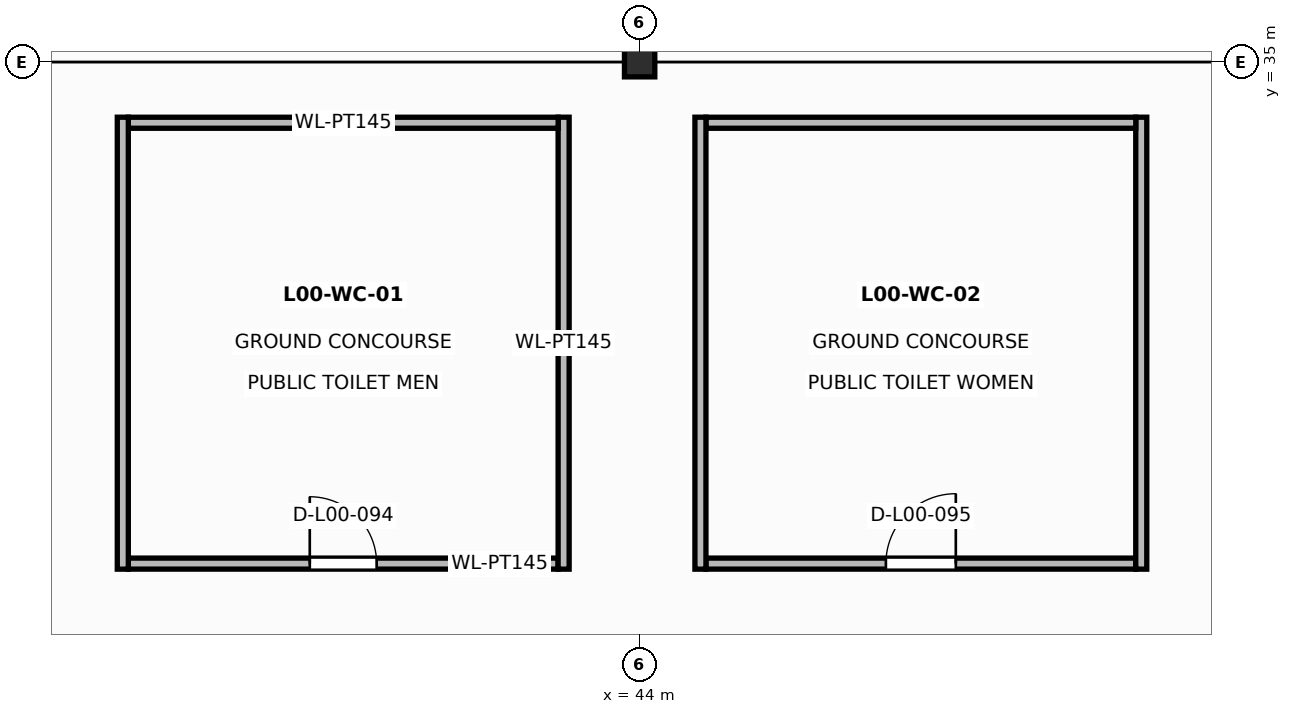
"""IFC4 building model, lengths in metres.
Left out: names, types, materials, properties, quantities, classifications, styles, units other than length and angle.
Written with IfcOpenShell. Run it as: python <this file> out.ifc"""

import sys

from ifc_helpers import new_model, si_unit, direction, frame, frame_2d, origin, origin_2d, place, context, subcontext, project, spatial, rectangle, i_section, extrude, element, fill, save


model = new_model("IFC4")
c1 = context("Model", 3, precision=1e-05, world=origin(), true_north=direction((0.0, 1.0)))
c2 = subcontext(c1, "Body", "Model", "MODEL_VIEW")
j1 = project(units=[si_unit("LENGTHUNIT", "METRE"), si_unit("PLANEANGLEUNIT", "RADIAN")], contexts=[c1])
p1 = place(None, origin())
s1 = spatial("IfcSite", under=j1, at=p1, CompositionType="ELEMENT")
p2 = place(p1, origin())
s2 = spatial("IfcBuilding", under=s1, at=p2, CompositionType="ELEMENT")
p3 = place(p2, origin())
s3 = spatial("IfcBuildingStorey", under=s2, at=p3, CompositionType="ELEMENT", Elevation=0.0)
p4 = place(p3, frame((44.0, 35.0, 0.0), z_axis=(0.0, 0.0, 1.0), x_axis=(1.0, 0.0, 0.0)))
e1 = element("IfcColumn", 1, at=p4, inside=s3, PredefinedType="COLUMN", context=c2, shape_type="SweptSolid", body=[
    extrude(i_section(OverallWidth=0.399, OverallDepth=0.393, WebThickness=0.023, FlangeThickness=0.037, at=origin_2d()), origin(), (0.0, 0.0, 1.0), 6.0),
])
p5 = place(p3, frame((37.273, 28.4, 0.0), z_axis=(0.0, 0.0, 1.0), x_axis=(1.0, 0.0, 0.0)))
e2 = element("IfcWall", 2, at=p5, inside=s3, PredefinedType="PARTITIONING", context=c2, shape_type="SweptSolid", body=[
    extrude(rectangle(XDim=5.655, YDim=0.145, at=frame_2d((2.828, 0.0))), origin(), (0.0, 0.0, 1.0), 5.73),
])
p6 = place(p5, frame((2.387, 0.0, 0.0)))
e3 = element("IfcOpeningElement", 3, at=p6, cuts=e2, PredefinedType="OPENING", context=c2, shape_type="SweptSolid", body=[
    extrude(rectangle(XDim=0.88, YDim=2.08, at=frame_2d((0.44, 1.04))), frame((0.0, 0.083, 0.0), z_axis=(0.0, -1.0, 0.0), x_axis=(1.0, 0.0, 0.0)), (0.0, 0.0, 1.0), 0.165),
])
p7 = place(p3, frame((43.0, 28.327, 0.0), z_axis=(0.0, 0.0, 1.0), x_axis=(0.0, 1.0, 0.0)))
e4 = element("IfcWall", 4, at=p7, inside=s3, PredefinedType="PARTITIONING", context=c2, shape_type="SweptSolid", body=[
    extrude(rectangle(XDim=5.946, YDim=0.145, at=frame_2d((2.973, 0.0))), origin(), (0.0, 0.0, 1.0), 5.73),
])
p8 = place(p3, frame((42.928, 34.2, 0.0), z_axis=(0.0, 0.0, 1.0), x_axis=(-1.0, 0.0, 0.0)))
e5 = element("IfcWall", 5, at=p8, inside=s3, PredefinedType="PARTITIONING", context=c2, shape_type="SweptSolid", body=[
    extrude(rectangle(XDim=5.655, YDim=0.145, at=frame_2d((2.828, 0.0))), origin(), (0.0, 0.0, 1.0), 5.73),
])
p9 = place(p3, frame((37.2, 34.273, 0.0), z_axis=(0.0, 0.0, 1.0), x_axis=(0.0, -1.0, 0.0)))
e6 = element("IfcWall", 6, at=p9, inside=s3, PredefinedType="PARTITIONING", context=c2, shape_type="SweptSolid", body=[
    extrude(rectangle(XDim=5.946, YDim=0.145, at=frame_2d((2.973, 0.0))), origin(), (0.0, 0.0, 1.0), 5.73),
])
p10 = place(p3, frame((44.872, 28.4, 0.0), z_axis=(0.0, 0.0, 1.0), x_axis=(1.0, 0.0, 0.0)))
e7 = element("IfcWall", 7, at=p10, inside=s3, PredefinedType="PARTITIONING", context=c2, shape_type="SweptSolid", body=[
    extrude(rectangle(XDim=5.656, YDim=0.145, at=frame_2d((2.828, 0.0))), origin(), (0.0, 0.0, 1.0), 5.73),
])
p11 = place(p10, frame((2.368, 0.0, 0.0)))
e8 = element("IfcOpeningElement", 8, at=p11, cuts=e7, PredefinedType="OPENING", context=c2, shape_type="SweptSolid", body=[
    extrude(rectangle(XDim=0.92, YDim=2.1, at=frame_2d((0.46, 1.05))), frame((0.0, 0.083, 0.0), z_axis=(0.0, -1.0, 0.0), x_axis=(1.0, 0.0, 0.0)), (0.0, 0.0, 1.0), 0.165),
])
p12 = place(p3, frame((50.6, 28.327, 0.0), z_axis=(0.0, 0.0, 1.0), x_axis=(0.0, 1.0, 0.0)))
e9 = element("IfcWall", 9, at=p12, inside=s3, PredefinedType="PARTITIONING", context=c2, shape_type="SweptSolid", body=[
    extrude(rectangle(XDim=5.946, YDim=0.145, at=frame_2d((2.973, 0.0))), origin(), (0.0, 0.0, 1.0), 5.73),
])
p13 = place(p3, frame((50.528, 34.2, 0.0), z_axis=(0.0, 0.0, 1.0), x_axis=(-1.0, 0.0, 0.0)))
e10 = element("IfcWall", 10, at=p13, inside=s3, PredefinedType="PARTITIONING", context=c2, shape_type="SweptSolid", body=[
    extrude(rectangle(XDim=5.656, YDim=0.145, at=frame_2d((2.828, 0.0))), origin(), (0.0, 0.0, 1.0), 5.73),
])
p14 = place(p3, frame((44.8, 34.273, 0.0), z_axis=(0.0, 0.0, 1.0), x_axis=(0.0, -1.0, 0.0)))
e11 = element("IfcWall", 11, at=p14, inside=s3, PredefinedType="PARTITIONING", context=c2, shape_type="SweptSolid", body=[
    extrude(rectangle(XDim=5.946, YDim=0.145, at=frame_2d((2.973, 0.0))), origin(), (0.0, 0.0, 1.0), 5.73),
])
p15 = place(p6, origin())
e12 = element("IfcDoor", 12, at=p15, inside=s3, OperationType="SINGLE_SWING_LEFT", PredefinedType="DOOR", context=c2, shape_type="SweptSolid", body=[
    extrude(rectangle(XDim=0.88, YDim=2.08, at=frame_2d((0.44, 1.04))), frame((0.0, 0.025, 0.0), z_axis=(0.0, -1.0, 0.0), x_axis=(1.0, 0.0, 0.0)), (0.0, 0.0, 1.0), 0.05),
])
fill(e3, e12)
p16 = place(p11, origin())
e13 = element("IfcDoor", 13, at=p16, inside=s3, OperationType="SINGLE_SWING_RIGHT", PredefinedType="DOOR", context=c2, shape_type="SweptSolid", body=[
    extrude(rectangle(XDim=0.92, YDim=2.1, at=frame_2d((0.46, 1.05))), frame((0.0, 0.025, 0.0), z_axis=(0.0, -1.0, 0.0), x_axis=(1.0, 0.0, 0.0)), (0.0, 0.0, 1.0), 0.05),
])
fill(e8, e13)
save(model, sys.argv[1])
